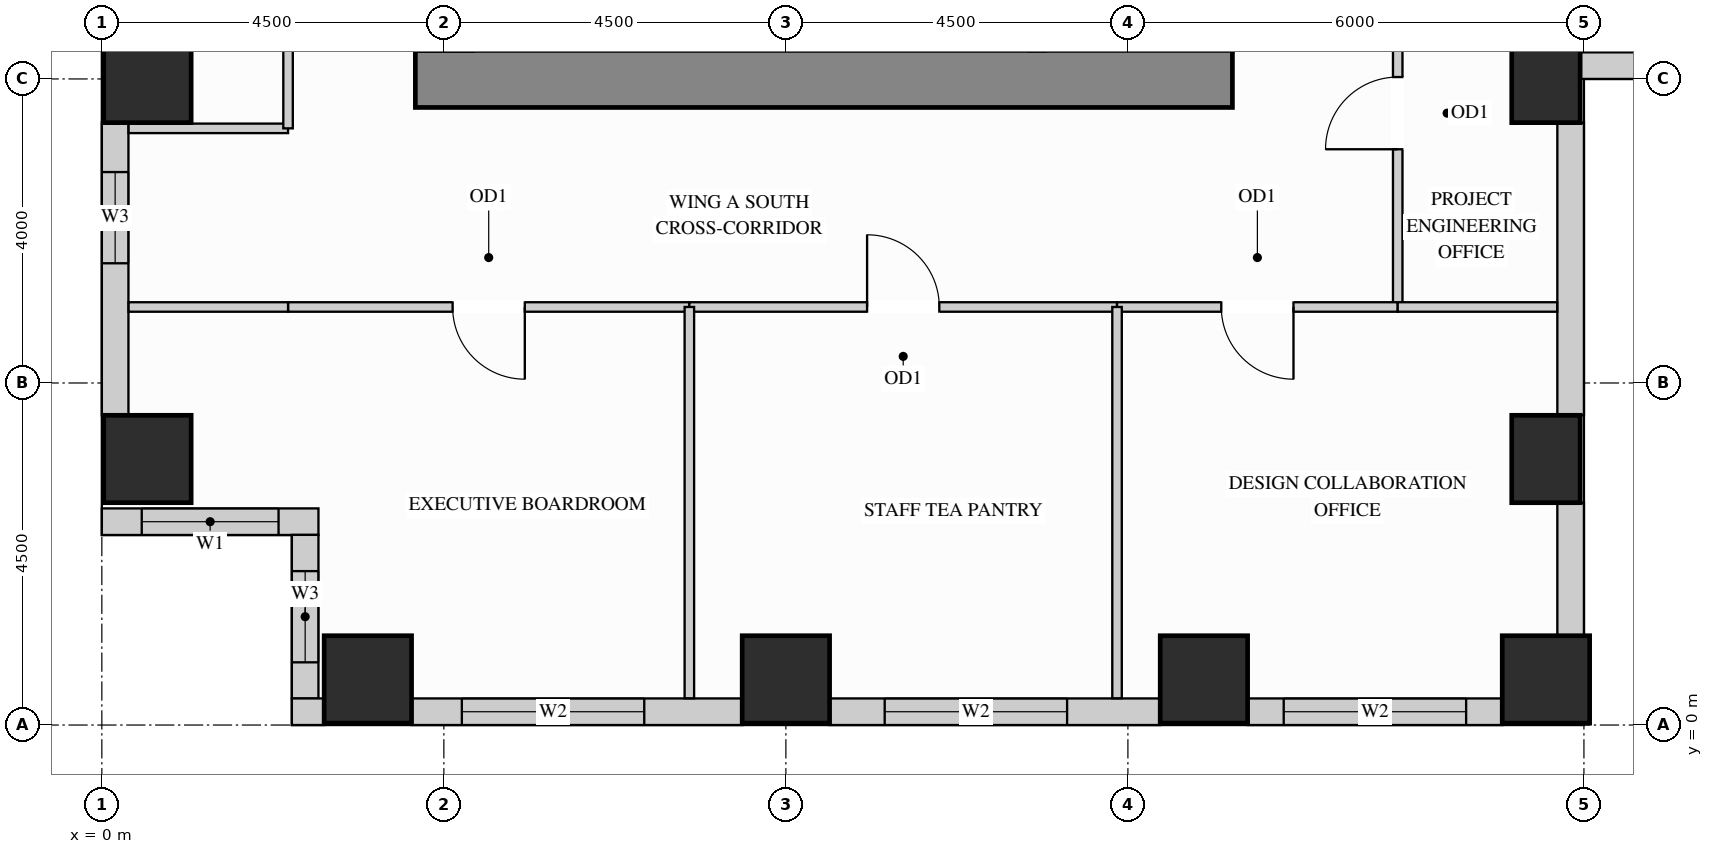
"""IFC4 building model, lengths in metres.
Left out: names, types, materials, properties, quantities, classifications, styles, units other than length and angle.
Written with IfcOpenShell. Run it as: python <this file> out.ifc"""

import sys

from ifc_helpers import new_model, si_unit, direction, frame, frame_2d, origin, origin_2d, place, context, subcontext, project, spatial, rectangle, extrude, source, transform, mapped, element, fill, save


model = new_model("IFC4")
c1 = context("Model", 3, precision=1e-05, world=origin(), true_north=direction((0.0, 1.0)))
c2 = subcontext(c1, "Body", "Model", "MODEL_VIEW")
j1 = project(units=[si_unit("LENGTHUNIT", "METRE"), si_unit("PLANEANGLEUNIT", "RADIAN")], contexts=[c1])
p1 = place(None, origin())
s1 = spatial("IfcSite", under=j1, at=p1, CompositionType="ELEMENT")
p2 = place(p1, origin())
s2 = spatial("IfcBuilding", under=s1, at=p2, CompositionType="ELEMENT")
p3 = place(p2, frame((0.0, 0.0, 106.2)))
s3 = spatial("IfcBuildingStorey", under=s2, at=p3, CompositionType="ELEMENT", Elevation=106.2)
m1 = source(origin(), c2, "Body", "SweptSolid", [
    extrude(rectangle(XDim=0.9, YDim=1.15, at=origin_2d()), origin(), (0.0, 0.0, 1.0), 3.38),
])
for number, where, z_axis, x_axis in (
    (1, (19.0, 3.5, 0.0), (0.0, 0.0, 1.0), (1.0, 0.0, 0.0)),
    (2, (19.0, 8.5, 0.0), (0.0, 0.0, 1.0), (1.0, 0.0, 0.0)),
):
    element("IfcColumn", number, at=place(p3, frame(where, z_axis=z_axis, x_axis=x_axis)), inside=s3, PredefinedType="COLUMN", context=c2, shape_type="MappedRepresentation", body=[
        mapped(m1, transform((0.0, 0.0, 0.0), x_axis=(1.0, 0.0, 0.0), y_axis=(0.0, 1.0, 0.0), z_axis=(0.0, 0.0, 1.0))),
    ])
m2 = source(origin(), c2, "Body", "SweptSolid", [
    extrude(rectangle(XDim=1.15, YDim=1.15, at=origin_2d()), origin(), (0.0, 0.0, 1.0), 3.38),
])
for number, where, z_axis, x_axis in (
    (3, (14.5, 0.6, 0.0), (0.0, 0.0, 1.0), (1.0, 0.0, 0.0)),
    (4, (19.0, 0.6, 0.0), (0.0, 0.0, 1.0), (1.0, 0.0, 0.0)),
    (5, (3.5, 0.6, 0.0), (0.0, 0.0, 1.0), (1.0, 0.0, 0.0)),
    (6, (9.0, 0.6, 0.0), (0.0, 0.0, 1.0), (1.0, 0.0, 0.0)),
    (7, (0.6, 3.5, 0.0), (0.0, 0.0, 1.0), (1.0, 0.0, 0.0)),
    (8, (0.6, 8.5, 0.0), (0.0, 0.0, 1.0), (1.0, 0.0, 0.0)),
):
    element("IfcColumn", number, at=place(p3, frame(where, z_axis=z_axis, x_axis=x_axis)), inside=s3, PredefinedType="COLUMN", context=c2, shape_type="MappedRepresentation", body=[
        mapped(m2, transform((0.0, 0.0, 0.0), x_axis=(1.0, 0.0, 0.0), y_axis=(0.0, 1.0, 0.0), z_axis=(0.0, 0.0, 1.0))),
    ])
m3 = source(origin(), c2, "Body", "SweptSolid", [
    extrude(rectangle(XDim=10.75, YDim=0.75, at=frame_2d((5.375, 0.0))), origin(), (0.0, 0.0, 1.0), 3.38),
])
p4 = place(p3, frame((4.125, 8.5, 0.0), z_axis=(0.0, 0.0, 1.0), x_axis=(1.0, 0.0, 0.0)))
e9 = element("IfcWall", 9, at=p4, inside=s3, PredefinedType="SHEAR", context=c2, shape_type="MappedRepresentation", body=[
    mapped(m3, transform((0.0, 0.0, 0.0), x_axis=(1.0, 0.0, 0.0), y_axis=(0.0, 1.0, 0.0), z_axis=(0.0, 0.0, 1.0))),
])
p5 = place(p3, frame((0.175, 7.927, 0.0), z_axis=(0.0, 0.0, 1.0), x_axis=(0.0, -1.0, 0.0)))
e10 = element("IfcWall", 10, at=p5, inside=s3, PredefinedType="SOLIDWALL", context=c2, shape_type="SweptSolid", body=[
    extrude(rectangle(XDim=3.854, YDim=0.35, at=frame_2d((1.927, 0.0))), origin(), (0.0, 0.0, 1.0), 3.365),
])
p6 = place(p5, frame((0.652, 0.0, 0.78)))
e11 = element("IfcOpeningElement", 11, at=p6, cuts=e10, PredefinedType="OPENING", context=c2, shape_type="SweptSolid", body=[
    extrude(rectangle(XDim=1.2, YDim=2.1, at=frame_2d((0.6, 1.05))), frame((0.0, 0.185, 0.0), z_axis=(0.0, -1.0, 0.0), x_axis=(1.0, 0.0, 0.0)), (0.0, 0.0, 1.0), 0.37),
])
p7 = place(p3, frame((0.0, 2.675, 0.0), z_axis=(0.0, 0.0, 1.0), x_axis=(1.0, 0.0, 0.0)))
e12 = element("IfcWall", 12, at=p7, inside=s3, PredefinedType="SOLIDWALL", context=c2, shape_type="SweptSolid", body=[
    extrude(rectangle(XDim=2.85, YDim=0.35, at=frame_2d((1.425, 0.0))), origin(), (0.0, 0.0, 1.0), 3.365),
])
p8 = place(p7, frame((0.525, 0.0, 0.78)))
e13 = element("IfcOpeningElement", 13, at=p8, cuts=e12, PredefinedType="OPENING", context=c2, shape_type="SweptSolid", body=[
    extrude(rectangle(XDim=1.8, YDim=2.1, at=frame_2d((0.9, 1.05))), frame((0.0, 0.185, 0.0), z_axis=(0.0, -1.0, 0.0), x_axis=(1.0, 0.0, 0.0)), (0.0, 0.0, 1.0), 0.37),
])
p9 = place(p3, frame((2.675, 2.502, 0.0), z_axis=(0.0, 0.0, 1.0), x_axis=(0.0, -1.0, 0.0)))
e14 = element("IfcWall", 14, at=p9, inside=s3, PredefinedType="SOLIDWALL", context=c2, shape_type="SweptSolid", body=[
    extrude(rectangle(XDim=2.154, YDim=0.35, at=frame_2d((1.077, 0.0))), origin(), (0.0, 0.0, 1.0), 3.365),
])
p10 = place(p9, frame((0.477, 0.0, 0.78)))
e15 = element("IfcOpeningElement", 15, at=p10, cuts=e14, PredefinedType="OPENING", context=c2, shape_type="SweptSolid", body=[
    extrude(rectangle(XDim=1.2, YDim=2.1, at=frame_2d((0.6, 1.05))), frame((0.0, 0.185, 0.0), z_axis=(0.0, -1.0, 0.0), x_axis=(1.0, 0.0, 0.0)), (0.0, 0.0, 1.0), 0.37),
])
m4 = source(origin(), c2, "Body", "SweptSolid", [
    extrude(rectangle(XDim=0.427, YDim=0.35, at=frame_2d((0.213, 0.0))), origin(), (0.0, 0.0, 1.0), 3.365),
])
p11 = place(p3, frame((2.5, 0.175, 0.0), z_axis=(0.0, 0.0, 1.0), x_axis=(1.0, 0.0, 0.0)))
e16 = element("IfcWall", 16, at=p11, inside=s3, PredefinedType="SOLIDWALL", context=c2, shape_type="MappedRepresentation", body=[
    mapped(m4, transform((0.0, 0.0, 0.0), x_axis=(1.0, 0.0, 0.0), y_axis=(0.0, 1.0, 0.0), z_axis=(0.0, 0.0, 1.0))),
])
p12 = place(p3, frame((4.073, 0.175, 0.0), z_axis=(0.0, 0.0, 1.0), x_axis=(1.0, 0.0, 0.0)))
e17 = element("IfcWall", 17, at=p12, inside=s3, PredefinedType="SOLIDWALL", context=c2, shape_type="SweptSolid", body=[
    extrude(rectangle(XDim=4.354, YDim=0.35, at=frame_2d((2.177, 0.0))), origin(), (0.0, 0.0, 1.0), 3.365),
])
p13 = place(p12, frame((0.664, 0.0, 0.78)))
e18 = element("IfcOpeningElement", 18, at=p13, cuts=e17, PredefinedType="OPENING", context=c2, shape_type="SweptSolid", body=[
    extrude(rectangle(XDim=2.4, YDim=2.1, at=frame_2d((1.2, 1.05))), frame((0.0, 0.185, 0.0), z_axis=(0.0, -1.0, 0.0), x_axis=(1.0, 0.0, 0.0)), (0.0, 0.0, 1.0), 0.37),
])
p14 = place(p3, frame((9.573, 0.175, 0.0), z_axis=(0.0, 0.0, 1.0), x_axis=(1.0, 0.0, 0.0)))
e19 = element("IfcWall", 19, at=p14, inside=s3, PredefinedType="SOLIDWALL", context=c2, shape_type="SweptSolid", body=[
    extrude(rectangle(XDim=4.354, YDim=0.35, at=frame_2d((2.177, 0.0))), origin(), (0.0, 0.0, 1.0), 3.365),
])
p15 = place(p14, frame((0.727, 0.0, 0.78)))
e20 = element("IfcOpeningElement", 20, at=p15, cuts=e19, PredefinedType="OPENING", context=c2, shape_type="SweptSolid", body=[
    extrude(rectangle(XDim=2.4, YDim=2.1, at=frame_2d((1.2, 1.05))), frame((0.0, 0.185, 0.0), z_axis=(0.0, -1.0, 0.0), x_axis=(1.0, 0.0, 0.0)), (0.0, 0.0, 1.0), 0.37),
])
p16 = place(p3, frame((15.073, 0.175, 0.0), z_axis=(0.0, 0.0, 1.0), x_axis=(1.0, 0.0, 0.0)))
e21 = element("IfcWall", 21, at=p16, inside=s3, PredefinedType="SOLIDWALL", context=c2, shape_type="SweptSolid", body=[
    extrude(rectangle(XDim=3.354, YDim=0.35, at=frame_2d((1.677, 0.0))), origin(), (0.0, 0.0, 1.0), 3.365),
])
p17 = place(p16, frame((0.477, 0.0, 0.78)))
e22 = element("IfcOpeningElement", 22, at=p17, cuts=e21, PredefinedType="OPENING", context=c2, shape_type="SweptSolid", body=[
    extrude(rectangle(XDim=2.4, YDim=2.1, at=frame_2d((1.2, 1.05))), frame((0.0, 0.185, 0.0), z_axis=(0.0, -1.0, 0.0), x_axis=(1.0, 0.0, 0.0)), (0.0, 0.0, 1.0), 0.37),
])
m5 = source(origin(), c2, "Body", "SweptSolid", [
    extrude(rectangle(XDim=1.754, YDim=0.35, at=frame_2d((0.877, 0.0))), origin(), (0.0, 0.0, 1.0), 2.519),
])
p18 = place(p3, frame((19.325, 1.173, 0.0), z_axis=(0.0, 0.0, 1.0), x_axis=(0.0, 1.0, 0.0)))
e23 = element("IfcWall", 23, at=p18, inside=s3, PredefinedType="SOLIDWALL", context=c2, shape_type="MappedRepresentation", body=[
    mapped(m5, transform((0.0, 0.0, 0.0), x_axis=(1.0, 0.0, 0.0), y_axis=(0.0, 1.0, 0.0), z_axis=(0.0, 0.0, 1.0))),
])
m6 = source(origin(), c2, "Body", "SweptSolid", [
    extrude(rectangle(XDim=3.854, YDim=0.35, at=frame_2d((1.927, 0.0))), origin(), (0.0, 0.0, 1.0), 2.519),
])
p19 = place(p3, frame((19.325, 4.073, 0.0), z_axis=(0.0, 0.0, 1.0), x_axis=(0.0, 1.0, 0.0)))
e24 = element("IfcWall", 24, at=p19, inside=s3, PredefinedType="SOLIDWALL", context=c2, shape_type="MappedRepresentation", body=[
    mapped(m6, transform((0.0, 0.0, 0.0), x_axis=(1.0, 0.0, 0.0), y_axis=(0.0, 1.0, 0.0), z_axis=(0.0, 0.0, 1.0))),
])
p20 = place(p3, frame((19.448, 8.675, 0.0), z_axis=(0.0, 0.0, 1.0), x_axis=(1.0, 0.0, 0.0)))
e25 = element("IfcWall", 25, at=p20, inside=s3, PredefinedType="SOLIDWALL", context=c2, shape_type="SweptSolid", body=[
    extrude(rectangle(XDim=3.504, YDim=0.35, at=frame_2d((1.752, 0.0))), origin(), (0.0, 0.0, 1.0), 3.365),
])
p21 = place(p20, frame((1.002, 0.0, 0.78)))
e26 = element("IfcOpeningElement", 26, at=p21, cuts=e25, PredefinedType="OPENING", context=c2, shape_type="SweptSolid", body=[
    extrude(rectangle(XDim=1.5, YDim=2.0, at=frame_2d((0.75, 1.0))), frame((0.0, 0.185, 0.0), z_axis=(0.0, -1.0, 0.0), x_axis=(1.0, 0.0, 0.0)), (0.0, 0.0, 1.0), 0.37),
])
p22 = place(p3, frame((17.05, 5.5, 0.0), z_axis=(0.0, 0.0, 1.0), x_axis=(0.0, 1.0, 0.0)))
e27 = element("IfcWall", 27, at=p22, inside=s3, PredefinedType="PARTITIONING", context=c2, shape_type="SweptSolid", body=[
    extrude(rectangle(XDim=5.1, YDim=0.125, at=frame_2d((2.55, 0.0))), origin(), (0.0, 0.0, 1.0), 3.365),
])
p23 = place(p22, frame((2.075, 0.0, 0.0)))
e28 = element("IfcOpeningElement", 28, at=p23, cuts=e27, PredefinedType="OPENING", context=c2, shape_type="SweptSolid", body=[
    extrude(rectangle(XDim=0.95, YDim=2.15, at=frame_2d((0.475, 1.075))), frame((0.0, 0.073, 0.0), z_axis=(0.0, -1.0, 0.0), x_axis=(1.0, 0.0, 0.0)), (0.0, 0.0, 1.0), 0.145),
])
m7 = source(origin(), c2, "Body", "SweptSolid", [
    extrude(rectangle(XDim=2.098, YDim=0.125, at=frame_2d((1.049, 0.0))), origin(), (0.0, 0.0, 1.0), 3.365),
])
p24 = place(p3, frame((0.352, 7.85, 0.0), z_axis=(0.0, 0.0, 1.0), x_axis=(1.0, 0.0, 0.0)))
e29 = element("IfcWall", 29, at=p24, inside=s3, PredefinedType="PARTITIONING", context=c2, shape_type="MappedRepresentation", body=[
    mapped(m7, transform((0.0, 0.0, 0.0), x_axis=(1.0, 0.0, 0.0), y_axis=(0.0, 1.0, 0.0), z_axis=(0.0, 0.0, 1.0))),
])
p25 = place(p3, frame((2.45, 5.5, 0.0), z_axis=(0.0, 0.0, 1.0), x_axis=(1.0, 0.0, 0.0)))
e30 = element("IfcWall", 30, at=p25, inside=s3, PredefinedType="PARTITIONING", context=c2, shape_type="SweptSolid", body=[
    extrude(rectangle(XDim=5.28, YDim=0.125, at=frame_2d((2.64, 0.0))), origin(), (0.0, 0.0, 1.0), 3.365),
])
p26 = place(p25, frame((2.165, 0.0, 0.0)))
e31 = element("IfcOpeningElement", 31, at=p26, cuts=e30, PredefinedType="OPENING", context=c2, shape_type="SweptSolid", body=[
    extrude(rectangle(XDim=0.95, YDim=2.15, at=frame_2d((0.475, 1.075))), frame((0.0, 0.073, 0.0), z_axis=(0.0, -1.0, 0.0), x_axis=(1.0, 0.0, 0.0)), (0.0, 0.0, 1.0), 0.145),
])
p27 = place(p3, frame((7.73, 5.5, 0.0), z_axis=(0.0, 0.0, 1.0), x_axis=(1.0, 0.0, 0.0)))
e32 = element("IfcWall", 32, at=p27, inside=s3, PredefinedType="PARTITIONING", context=c2, shape_type="SweptSolid", body=[
    extrude(rectangle(XDim=5.627, YDim=0.125, at=frame_2d((2.813, 0.0))), origin(), (0.0, 0.0, 1.0), 3.365),
])
p28 = place(p27, frame((2.338, 0.0, 0.0)))
e33 = element("IfcOpeningElement", 33, at=p28, cuts=e32, PredefinedType="OPENING", context=c2, shape_type="SweptSolid", body=[
    extrude(rectangle(XDim=0.95, YDim=2.15, at=frame_2d((0.475, 1.075))), frame((0.0, 0.073, 0.0), z_axis=(0.0, -1.0, 0.0), x_axis=(1.0, 0.0, 0.0)), (0.0, 0.0, 1.0), 0.145),
])
p29 = place(p3, frame((13.357, 5.5, 0.0), z_axis=(0.0, 0.0, 1.0), x_axis=(1.0, 0.0, 0.0)))
e34 = element("IfcWall", 34, at=p29, inside=s3, PredefinedType="PARTITIONING", context=c2, shape_type="SweptSolid", body=[
    extrude(rectangle(XDim=3.693, YDim=0.125, at=frame_2d((1.847, 0.0))), origin(), (0.0, 0.0, 1.0), 3.365),
])
p30 = place(p29, frame((1.372, 0.0, 0.0)))
e35 = element("IfcOpeningElement", 35, at=p30, cuts=e34, PredefinedType="OPENING", context=c2, shape_type="SweptSolid", body=[
    extrude(rectangle(XDim=0.95, YDim=2.15, at=frame_2d((0.475, 1.075))), frame((0.0, 0.073, 0.0), z_axis=(0.0, -1.0, 0.0), x_axis=(1.0, 0.0, 0.0)), (0.0, 0.0, 1.0), 0.145),
])
for number, where, z_axis, x_axis in (
    (36, (0.352, 5.5, 0.0), (0.0, 0.0, 1.0), (1.0, 0.0, 0.0)),
    (37, (17.05, 5.5, 0.0), (0.0, 0.0, 1.0), (1.0, 0.0, 0.0)),
):
    element("IfcWall", number, at=place(p3, frame(where, z_axis=z_axis, x_axis=x_axis)), inside=s3, PredefinedType="PARTITIONING", context=c2, shape_type="MappedRepresentation", body=[
        mapped(m7, transform((0.0, 0.0, 0.0), x_axis=(1.0, 0.0, 0.0), y_axis=(0.0, 1.0, 0.0), z_axis=(0.0, 0.0, 1.0))),
    ])
m8 = source(origin(), c2, "Body", "SweptSolid", [
    extrude(rectangle(XDim=5.148, YDim=0.125, at=frame_2d((2.574, 0.0))), origin(), (0.0, 0.0, 1.0), 3.365),
])
for number, where, z_axis, x_axis in (
    (38, (7.73, 0.352, 0.0), (0.0, 0.0, 1.0), (0.0, 1.0, 0.0)),
    (39, (13.357, 0.352, 0.0), (0.0, 0.0, 1.0), (0.0, 1.0, 0.0)),
):
    element("IfcWall", number, at=place(p3, frame(where, z_axis=z_axis, x_axis=x_axis)), inside=s3, PredefinedType="PARTITIONING", context=c2, shape_type="MappedRepresentation", body=[
        mapped(m8, transform((0.0, 0.0, 0.0), x_axis=(1.0, 0.0, 0.0), y_axis=(0.0, 1.0, 0.0), z_axis=(0.0, 0.0, 1.0))),
    ])
p31 = place(p3, frame((2.45, 7.85, 0.0), z_axis=(0.0, 0.0, 1.0), x_axis=(0.0, 1.0, 0.0)))
e40 = element("IfcWall", 40, at=p31, inside=s3, PredefinedType="PARTITIONING", context=c2, shape_type="SweptSolid", body=[
    extrude(rectangle(XDim=7.25, YDim=0.125, at=frame_2d((3.625, 0.0))), origin(), (0.0, 0.0, 1.0), 3.365),
])
p32 = place(p31, frame((3.15, 0.0, 0.0)))
e41 = element("IfcOpeningElement", 41, at=p32, cuts=e40, PredefinedType="OPENING", context=c2, shape_type="SweptSolid", body=[
    extrude(rectangle(XDim=0.95, YDim=2.15, at=frame_2d((0.475, 1.075))), frame((0.0, 0.073, 0.0), z_axis=(0.0, -1.0, 0.0), x_axis=(1.0, 0.0, 0.0)), (0.0, 0.0, 1.0), 0.145),
])
m9 = source(origin(), c2, "Body", "SweptSolid", [
    extrude(rectangle(XDim=0.95, YDim=2.15, at=frame_2d((0.475, 1.075))), frame((0.0, 0.025, 0.0), z_axis=(0.0, -1.0, 0.0), x_axis=(1.0, 0.0, 0.0)), (0.0, 0.0, 1.0), 0.05),
])
p33 = place(p23, origin())
e42 = element("IfcDoor", 42, at=p33, inside=s3, OperationType="SINGLE_SWING_LEFT", PredefinedType="DOOR", context=c2, shape_type="MappedRepresentation", body=[
    mapped(m9, transform((0.0, 0.0, 0.0), x_axis=(1.0, 0.0, 0.0), y_axis=(0.0, 1.0, 0.0), z_axis=(0.0, 0.0, 1.0))),
])
fill(e28, e42)
p34 = place(p26, origin())
e43 = element("IfcDoor", 43, at=p34, inside=s3, OperationType="SINGLE_SWING_RIGHT", PredefinedType="DOOR", context=c2, shape_type="MappedRepresentation", body=[
    mapped(m9, transform((0.0, 0.0, 0.0), x_axis=(1.0, 0.0, 0.0), y_axis=(0.0, 1.0, 0.0), z_axis=(0.0, 0.0, 1.0))),
])
fill(e31, e43)
p35 = place(p28, origin())
e44 = element("IfcDoor", 44, at=p35, inside=s3, OperationType="SINGLE_SWING_LEFT", PredefinedType="DOOR", context=c2, shape_type="MappedRepresentation", body=[
    mapped(m9, transform((0.0, 0.0, 0.0), x_axis=(1.0, 0.0, 0.0), y_axis=(0.0, 1.0, 0.0), z_axis=(0.0, 0.0, 1.0))),
])
fill(e33, e44)
p36 = place(p30, origin())
e45 = element("IfcDoor", 45, at=p36, inside=s3, OperationType="SINGLE_SWING_RIGHT", PredefinedType="DOOR", context=c2, shape_type="MappedRepresentation", body=[
    mapped(m9, transform((0.0, 0.0, 0.0), x_axis=(1.0, 0.0, 0.0), y_axis=(0.0, 1.0, 0.0), z_axis=(0.0, 0.0, 1.0))),
])
fill(e35, e45)
m10 = source(origin(), c2, "Body", "SweptSolid", [
    extrude(rectangle(XDim=1.8, YDim=2.1, at=frame_2d((0.9, 1.05))), frame((0.0, 0.03, 0.0), z_axis=(0.0, -1.0, 0.0), x_axis=(1.0, 0.0, 0.0)), (0.0, 0.0, 1.0), 0.06),
])
p37 = place(p8, origin())
e46 = element("IfcWindow", 46, at=p37, inside=s3, PartitioningType="SINGLE_PANEL", PredefinedType="WINDOW", context=c2, shape_type="MappedRepresentation", body=[
    mapped(m10, transform((0.0, 0.0, 0.0), x_axis=(1.0, 0.0, 0.0), y_axis=(0.0, 1.0, 0.0), z_axis=(0.0, 0.0, 1.0))),
])
fill(e13, e46)
m11 = source(origin(), c2, "Body", "SweptSolid", [
    extrude(rectangle(XDim=2.4, YDim=2.1, at=frame_2d((1.2, 1.05))), frame((0.0, 0.03, 0.0), z_axis=(0.0, -1.0, 0.0), x_axis=(1.0, 0.0, 0.0)), (0.0, 0.0, 1.0), 0.06),
])
p38 = place(p13, origin())
e47 = element("IfcWindow", 47, at=p38, inside=s3, PartitioningType="SINGLE_PANEL", PredefinedType="WINDOW", context=c2, shape_type="MappedRepresentation", body=[
    mapped(m11, transform((0.0, 0.0, 0.0), x_axis=(1.0, 0.0, 0.0), y_axis=(0.0, 1.0, 0.0), z_axis=(0.0, 0.0, 1.0))),
])
fill(e18, e47)
p39 = place(p15, origin())
e48 = element("IfcWindow", 48, at=p39, inside=s3, PartitioningType="SINGLE_PANEL", PredefinedType="WINDOW", context=c2, shape_type="MappedRepresentation", body=[
    mapped(m11, transform((0.0, 0.0, 0.0), x_axis=(1.0, 0.0, 0.0), y_axis=(0.0, 1.0, 0.0), z_axis=(0.0, 0.0, 1.0))),
])
fill(e20, e48)
p40 = place(p17, origin())
e49 = element("IfcWindow", 49, at=p40, inside=s3, PartitioningType="SINGLE_PANEL", PredefinedType="WINDOW", context=c2, shape_type="MappedRepresentation", body=[
    mapped(m11, transform((0.0, 0.0, 0.0), x_axis=(1.0, 0.0, 0.0), y_axis=(0.0, 1.0, 0.0), z_axis=(0.0, 0.0, 1.0))),
])
fill(e22, e49)
m12 = source(origin(), c2, "Body", "SweptSolid", [
    extrude(rectangle(XDim=1.2, YDim=2.1, at=frame_2d((0.6, 1.05))), frame((0.0, 0.03, 0.0), z_axis=(0.0, -1.0, 0.0), x_axis=(1.0, 0.0, 0.0)), (0.0, 0.0, 1.0), 0.06),
])
p41 = place(p6, origin())
e50 = element("IfcWindow", 50, at=p41, inside=s3, PartitioningType="SINGLE_PANEL", PredefinedType="WINDOW", context=c2, shape_type="MappedRepresentation", body=[
    mapped(m12, transform((0.0, 0.0, 0.0), x_axis=(1.0, 0.0, 0.0), y_axis=(0.0, 1.0, 0.0), z_axis=(0.0, 0.0, 1.0))),
])
fill(e11, e50)
p42 = place(p10, origin())
e51 = element("IfcWindow", 51, at=p42, inside=s3, PartitioningType="SINGLE_PANEL", PredefinedType="WINDOW", context=c2, shape_type="MappedRepresentation", body=[
    mapped(m12, transform((0.0, 0.0, 0.0), x_axis=(1.0, 0.0, 0.0), y_axis=(0.0, 1.0, 0.0), z_axis=(0.0, 0.0, 1.0))),
])
fill(e15, e51)
save(model, sys.argv[1])
